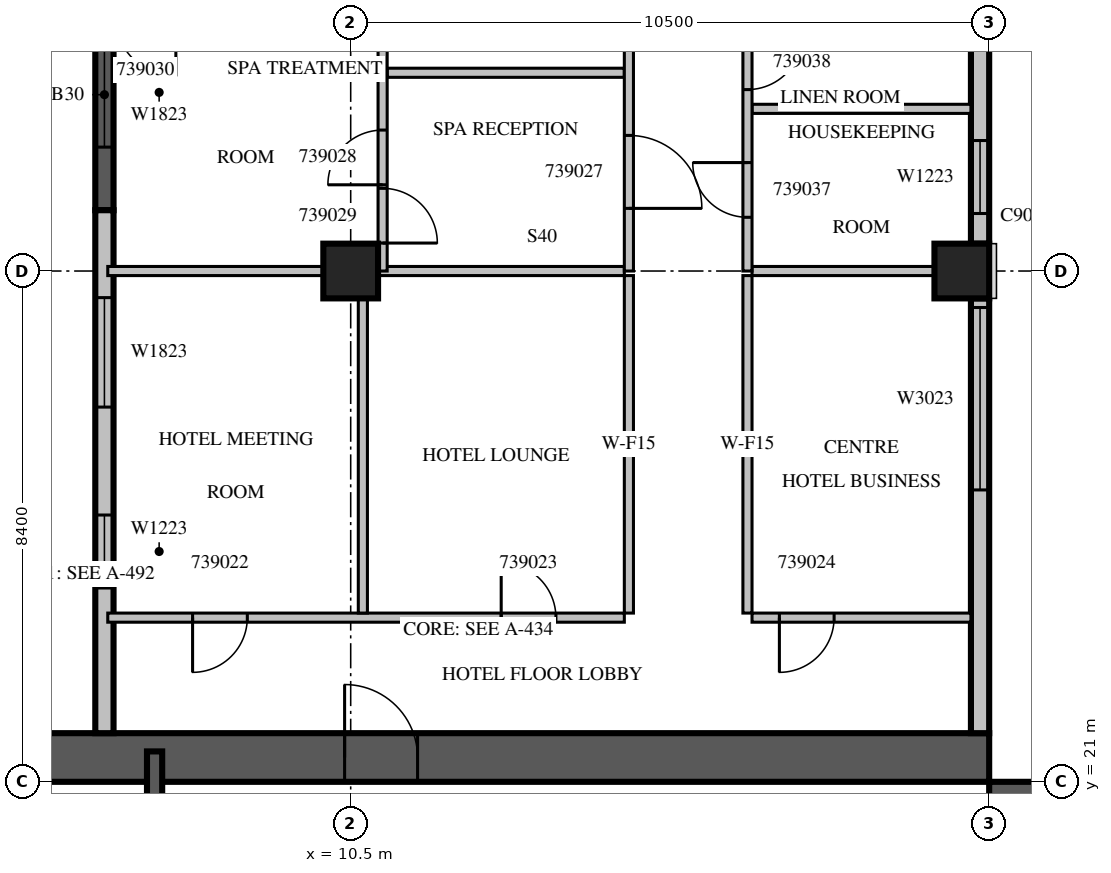
"""IFC4 building model, lengths in metres.
Left out: names, types, materials, properties, quantities, classifications, styles, units other than length and angle.
Written with IfcOpenShell. Run it as: python <this file> out.ifc"""

import sys

from ifc_helpers import new_model, si_unit, direction, frame, frame_2d, origin, origin_2d, place, context, subcontext, project, spatial, rectangle, extrude, source, transform, mapped, element, fill, save


model = new_model("IFC4")
c1 = context("Model", 3, precision=1e-05, world=origin(), true_north=direction((0.0, 1.0)))
c2 = subcontext(c1, "Body", "Model", "MODEL_VIEW")
j1 = project(units=[si_unit("LENGTHUNIT", "METRE"), si_unit("PLANEANGLEUNIT", "RADIAN")], contexts=[c1])
p1 = place(None, origin())
s1 = spatial("IfcSite", under=j1, at=p1, CompositionType="ELEMENT")
p2 = place(p1, origin())
s2 = spatial("IfcBuilding", under=s1, at=p2, CompositionType="ELEMENT")
p3 = place(p2, frame((0.0, 0.0, 181.6)))
s3 = spatial("IfcBuildingStorey", under=s2, at=p3, CompositionType="ELEMENT", Elevation=181.6)
m1 = source(origin(), c2, "Body", "SweptSolid", [
    extrude(rectangle(XDim=0.9, YDim=0.9, at=origin_2d()), origin(), (0.0, 0.0, 1.0), 3.8),
])
for number, where, z_axis, x_axis in (
    (1, (10.5, 29.4, 0.0), (0.0, 0.0, 1.0), (1.0, 0.0, 0.0)),
    (2, (20.55, 29.4, 0.0), (0.0, 0.0, 1.0), (1.0, 0.0, 0.0)),
):
    element("IfcColumn", number, at=place(p3, frame(where, z_axis=z_axis, x_axis=x_axis)), inside=s3, PredefinedType="COLUMN", context=c2, shape_type="MappedRepresentation", body=[
        mapped(m1, transform((0.0, 0.0, 0.0), scale=1.0)),
    ])
m2 = source(origin(), c2, "Body", "SweptSolid", [
    extrude(rectangle(XDim=16.8, YDim=0.8, at=frame_2d((8.4, 0.0))), origin(), (0.0, 0.0, 1.0), 3.8),
])
p4 = place(p3, frame((21.4, 4.2, 0.0), z_axis=(0.0, 0.0, 1.0), x_axis=(0.0, 1.0, 0.0)))
e3 = element("IfcWall", 3, at=p4, inside=s3, PredefinedType="SHEAR", context=c2, shape_type="MappedRepresentation", body=[
    mapped(m2, transform((0.0, 0.0, 0.0), scale=1.0)),
])
m3 = source(origin(), c2, "Body", "SweptSolid", [
    extrude(rectangle(XDim=2.2, YDim=2.1, at=frame_2d((1.1, 1.05))), frame((0.0, 0.41, 0.0), z_axis=(0.0, -1.0, 0.0), x_axis=(1.0, 0.0, 0.0)), (0.0, 0.0, 1.0), 0.82),
])
p5 = place(p4, frame((4.2, 0.0, 0.0)))
e4 = element("IfcOpeningElement", 4, at=p5, cuts=e3, PredefinedType="OPENING", context=c2, shape_type="MappedRepresentation", body=[
    mapped(m3, transform((0.0, 0.0, 0.0), scale=1.0)),
])
m4 = source(origin(), c2, "Body", "SweptSolid", [
    extrude(rectangle(XDim=1.2, YDim=2.1, at=frame_2d((0.6, 1.05))), frame((0.0, 0.41, 0.0), z_axis=(0.0, -1.0, 0.0), x_axis=(1.0, 0.0, 0.0)), (0.0, 0.0, 1.0), 0.82),
])
p6 = place(p4, frame((14.7, 0.0, 0.0)))
e5 = element("IfcOpeningElement", 5, at=p6, cuts=e3, PredefinedType="OPENING", context=c2, shape_type="MappedRepresentation", body=[
    mapped(m4, transform((0.0, 0.0, 0.0), scale=1.0)),
])
p7 = place(p3, frame((4.2, 21.4, 0.0), z_axis=(0.0, 0.0, 1.0), x_axis=(1.0, 0.0, 0.0)))
e6 = element("IfcWall", 6, at=p7, inside=s3, PredefinedType="SHEAR", context=c2, shape_type="MappedRepresentation", body=[
    mapped(m2, transform((0.0, 0.0, 0.0), scale=1.0)),
])
p8 = place(p7, frame((6.2, 0.0, 0.0)))
e7 = element("IfcOpeningElement", 7, at=p8, cuts=e6, PredefinedType="OPENING", context=c2, shape_type="MappedRepresentation", body=[
    mapped(m4, transform((0.0, 0.0, 0.0), scale=1.0)),
])
m5 = source(origin(), c2, "Body", "SweptSolid", [
    extrude(rectangle(XDim=7.15, YDim=0.3, at=frame_2d((3.575, 0.0))), origin(), (0.0, 0.0, 1.0), 3.4),
])
p9 = place(p3, frame((20.85, 21.8, 0.0), z_axis=(0.0, 0.0, 1.0), x_axis=(0.0, 1.0, 0.0)))
e8 = element("IfcWall", 8, at=p9, inside=s3, PredefinedType="STANDARD", context=c2, shape_type="MappedRepresentation", body=[
    mapped(m5, transform((0.0, 0.0, 0.0), scale=1.0)),
])
m6 = source(origin(), c2, "Body", "SweptSolid", [
    extrude(rectangle(XDim=3.0, YDim=2.3, at=frame_2d((1.5, 1.15))), frame((0.0, 0.16, 0.0), z_axis=(0.0, -1.0, 0.0), x_axis=(1.0, 0.0, 0.0)), (0.0, 0.0, 1.0), 0.32),
])
p10 = place(p9, frame((4.0, 0.0, 0.6)))
e9 = element("IfcOpeningElement", 9, at=p10, cuts=e8, PredefinedType="OPENING", context=c2, shape_type="MappedRepresentation", body=[
    mapped(m6, transform((0.0, 0.0, 0.0), scale=1.0)),
])
m7 = source(origin(), c2, "Body", "SweptSolid", [
    extrude(rectangle(XDim=7.5, YDim=0.3, at=frame_2d((3.75, 0.0))), origin(), (0.0, 0.0, 1.0), 3.4),
])
p11 = place(p3, frame((20.85, 29.85, 0.0), z_axis=(0.0, 0.0, 1.0), x_axis=(0.0, 1.0, 0.0)))
e10 = element("IfcWall", 10, at=p11, inside=s3, PredefinedType="STANDARD", context=c2, shape_type="MappedRepresentation", body=[
    mapped(m7, transform((0.0, 0.0, 0.0), scale=1.0)),
])
m8 = source(origin(), c2, "Body", "SweptSolid", [
    extrude(rectangle(XDim=1.2, YDim=2.3, at=frame_2d((0.6, 1.15))), frame((0.0, 0.16, 0.0), z_axis=(0.0, -1.0, 0.0), x_axis=(1.0, 0.0, 0.0)), (0.0, 0.0, 1.0), 0.32),
])
p12 = place(p11, frame((0.496, 0.0, 0.6)))
e11 = element("IfcOpeningElement", 11, at=p12, cuts=e10, PredefinedType="OPENING", context=c2, shape_type="MappedRepresentation", body=[
    mapped(m8, transform((0.0, 0.0, 0.0), scale=1.0)),
])
m9 = source(origin(), c2, "Body", "SweptSolid", [
    extrude(rectangle(XDim=1.0, YDim=2.1, at=frame_2d((0.5, 1.05))), frame((0.0, 0.16, 0.0), z_axis=(0.0, -1.0, 0.0), x_axis=(1.0, 0.0, 0.0)), (0.0, 0.0, 1.0), 0.32),
])
p13 = place(p11, frame((5.35, 0.0, 0.0)))
e12 = element("IfcOpeningElement", 12, at=p13, cuts=e10, PredefinedType="OPENING", context=c2, shape_type="MappedRepresentation", body=[
    mapped(m9, transform((0.0, 0.0, 0.0), scale=1.0)),
])
m10 = source(origin(), c2, "Body", "SweptSolid", [
    extrude(rectangle(XDim=3.8, YDim=0.3, at=frame_2d((1.9, 0.0))), origin(), (0.0, 0.0, 1.0), 3.4),
])
p14 = place(p3, frame((6.45, 34.2, 0.0), z_axis=(0.0, 0.0, 1.0), x_axis=(0.0, -1.0, 0.0)))
e13 = element("IfcWall", 13, at=p14, inside=s3, PredefinedType="SOLIDWALL", context=c2, shape_type="MappedRepresentation", body=[
    mapped(m10, transform((0.0, 0.0, 0.0), scale=1.0)),
])
m11 = source(origin(), c2, "Body", "SweptSolid", [
    extrude(rectangle(XDim=1.8, YDim=2.3, at=frame_2d((0.9, 1.15))), frame((0.0, 0.16, 0.0), z_axis=(0.0, -1.0, 0.0), x_axis=(1.0, 0.0, 0.0)), (0.0, 0.0, 1.0), 0.32),
])
p15 = place(p14, frame((0.963, 0.0, 0.6)))
e14 = element("IfcOpeningElement", 14, at=p15, cuts=e13, PredefinedType="OPENING", context=c2, shape_type="MappedRepresentation", body=[
    mapped(m11, transform((0.0, 0.0, 0.0), scale=1.0)),
])
p16 = place(p3, frame((6.45, 30.4, 0.0), z_axis=(0.0, 0.0, 1.0), x_axis=(0.0, -1.0, 0.0)))
e15 = element("IfcWall", 15, at=p16, inside=s3, PredefinedType="STANDARD", context=c2, shape_type="SweptSolid", body=[
    extrude(rectangle(XDim=8.6, YDim=0.3, at=frame_2d((4.3, 0.0))), origin(), (0.0, 0.0, 1.0), 3.4),
])
p17 = place(p16, frame((1.438, 0.0, 0.6)))
e16 = element("IfcOpeningElement", 16, at=p17, cuts=e15, PredefinedType="OPENING", context=c2, shape_type="MappedRepresentation", body=[
    mapped(m11, transform((0.0, 0.0, 0.0), scale=1.0)),
])
p18 = place(p16, frame((5.013, 0.0, 0.6)))
e17 = element("IfcOpeningElement", 17, at=p18, cuts=e15, PredefinedType="OPENING", context=c2, shape_type="MappedRepresentation", body=[
    mapped(m8, transform((0.0, 0.0, 0.0), scale=1.0)),
])
m12 = source(origin(), c2, "Body", "SweptSolid", [
    extrude(rectangle(XDim=6.6, YDim=0.25, at=frame_2d((3.3, 0.0))), origin(), (0.0, 0.0, 1.0), 3.4),
])
p19 = place(p3, frame((7.275, 14.9, 0.0), z_axis=(0.0, 0.0, 1.0), x_axis=(0.0, 1.0, 0.0)))
e18 = element("IfcWall", 18, at=p19, inside=s3, PredefinedType="SOLIDWALL", context=c2, shape_type="MappedRepresentation", body=[
    mapped(m12, transform((0.0, 0.0, 0.0), scale=1.0)),
])
m13 = source(origin(), c2, "Body", "SweptSolid", [
    extrude(rectangle(XDim=1.1, YDim=2.1, at=frame_2d((0.55, 1.05))), frame((0.0, 0.135, 0.0), z_axis=(0.0, -1.0, 0.0), x_axis=(1.0, 0.0, 0.0)), (0.0, 0.0, 1.0), 0.27),
])
p20 = place(p19, frame((0.15, 0.0, 0.0)))
e19 = element("IfcOpeningElement", 19, at=p20, cuts=e18, PredefinedType="OPENING", context=c2, shape_type="MappedRepresentation", body=[
    mapped(m13, transform((0.0, 0.0, 0.0), scale=1.0)),
])
m14 = source(origin(), c2, "Body", "SweptSolid", [
    extrude(rectangle(XDim=8.495, YDim=0.15, at=frame_2d((4.247, 0.0))), origin(), (0.0, 0.0, 1.0), 3.4),
])
p21 = place(p3, frame((6.505, 23.7, 0.0), z_axis=(0.0, 0.0, 1.0), x_axis=(1.0, 0.0, 0.0)))
e20 = element("IfcWall", 20, at=p21, inside=s3, PredefinedType="PARTITIONING", context=c2, shape_type="MappedRepresentation", body=[
    mapped(m14, transform((0.0, 0.0, 0.0), scale=1.0)),
])
m15 = source(origin(), c2, "Body", "SweptSolid", [
    extrude(rectangle(XDim=0.9, YDim=2.1, at=frame_2d((0.45, 1.05))), frame((0.0, 0.085, 0.0), z_axis=(0.0, -1.0, 0.0), x_axis=(1.0, 0.0, 0.0)), (0.0, 0.0, 1.0), 0.17),
])
p22 = place(p21, frame((1.395, 0.0, 0.0)))
e21 = element("IfcOpeningElement", 21, at=p22, cuts=e20, PredefinedType="OPENING", context=c2, shape_type="MappedRepresentation", body=[
    mapped(m15, transform((0.0, 0.0, 0.0), scale=1.0)),
])
p23 = place(p21, frame((6.47, 0.0, 0.0)))
e22 = element("IfcOpeningElement", 22, at=p23, cuts=e20, PredefinedType="OPENING", context=c2, shape_type="MappedRepresentation", body=[
    mapped(m15, transform((0.0, 0.0, 0.0), scale=1.0)),
])
m16 = source(origin(), c2, "Body", "SweptSolid", [
    extrude(rectangle(XDim=3.6, YDim=0.15, at=frame_2d((1.8, 0.0))), origin(), (0.0, 0.0, 1.0), 3.4),
])
p24 = place(p3, frame((17.1, 23.7, 0.0), z_axis=(0.0, 0.0, 1.0), x_axis=(1.0, 0.0, 0.0)))
e23 = element("IfcWall", 23, at=p24, inside=s3, PredefinedType="PARTITIONING", context=c2, shape_type="MappedRepresentation", body=[
    mapped(m16, transform((0.0, 0.0, 0.0), scale=1.0)),
])
p25 = place(p24, frame((0.45, 0.0, 0.0)))
e24 = element("IfcOpeningElement", 24, at=p25, cuts=e23, PredefinedType="OPENING", context=c2, shape_type="MappedRepresentation", body=[
    mapped(m15, transform((0.0, 0.0, 0.0), scale=1.0)),
])
m17 = source(origin(), c2, "Body", "SweptSolid", [
    extrude(rectangle(XDim=5.176, YDim=0.15, at=frame_2d((2.588, 0.0))), origin(), (0.0, 0.0, 1.0), 3.4),
])
p26 = place(p3, frame((10.7, 23.775, 0.0), z_axis=(0.0, 0.0, 1.0), x_axis=(0.0, 1.0, 0.0)))
e25 = element("IfcWall", 25, at=p26, inside=s3, PredefinedType="PARTITIONING", context=c2, shape_type="MappedRepresentation", body=[
    mapped(m17, transform((0.0, 0.0, 0.0), scale=1.0)),
])
m18 = source(origin(), c2, "Body", "SweptSolid", [
    extrude(rectangle(XDim=5.55, YDim=0.15, at=frame_2d((2.775, 0.0))), origin(), (0.0, 0.0, 1.0), 3.4),
])
for number, where, z_axis, x_axis in (
    (26, (15.075, 23.775, 0.0), (0.0, 0.0, 1.0), (0.0, 1.0, 0.0)),
    (27, (17.025, 29.325, 0.0), (0.0, 0.0, 1.0), (0.0, -1.0, 0.0)),
):
    element("IfcWall", number, at=place(p3, frame(where, z_axis=z_axis, x_axis=x_axis)), inside=s3, PredefinedType="PARTITIONING", context=c2, shape_type="MappedRepresentation", body=[
        mapped(m18, transform((0.0, 0.0, 0.0), scale=1.0)),
    ])
m19 = source(origin(), c2, "Body", "SweptSolid", [
    extrude(rectangle(XDim=3.546, YDim=0.15, at=frame_2d((1.773, 0.0))), origin(), (0.0, 0.0, 1.0), 3.4),
])
p27 = place(p3, frame((10.051, 29.4, 0.0), z_axis=(0.0, 0.0, 1.0), x_axis=(-1.0, 0.0, 0.0)))
e28 = element("IfcWall", 28, at=p27, inside=s3, PredefinedType="PARTITIONING", context=c2, shape_type="MappedRepresentation", body=[
    mapped(m19, transform((0.0, 0.0, 0.0), scale=1.0)),
])
m20 = source(origin(), c2, "Body", "SweptSolid", [
    extrude(rectangle(XDim=4.051, YDim=0.15, at=frame_2d((2.026, 0.0))), origin(), (0.0, 0.0, 1.0), 3.4),
])
p28 = place(p3, frame((15.0, 29.4, 0.0), z_axis=(0.0, 0.0, 1.0), x_axis=(-1.0, 0.0, 0.0)))
e29 = element("IfcWall", 29, at=p28, inside=s3, PredefinedType="PARTITIONING", context=c2, shape_type="MappedRepresentation", body=[
    mapped(m20, transform((0.0, 0.0, 0.0), scale=1.0)),
])
m21 = source(origin(), c2, "Body", "SweptSolid", [
    extrude(rectangle(XDim=3.001, YDim=0.15, at=frame_2d((1.5, 0.0))), origin(), (0.0, 0.0, 1.0), 3.4),
])
p29 = place(p3, frame((20.101, 29.4, 0.0), z_axis=(0.0, 0.0, 1.0), x_axis=(-1.0, 0.0, 0.0)))
e30 = element("IfcWall", 30, at=p29, inside=s3, PredefinedType="PARTITIONING", context=c2, shape_type="MappedRepresentation", body=[
    mapped(m21, transform((0.0, 0.0, 0.0), scale=1.0)),
])
m22 = source(origin(), c2, "Body", "SweptSolid", [
    extrude(rectangle(XDim=3.9, YDim=0.15, at=frame_2d((1.95, 0.0))), origin(), (0.0, 0.0, 1.0), 3.4),
])
p30 = place(p3, frame((15.0, 32.66, 0.0), z_axis=(0.0, 0.0, 1.0), x_axis=(-1.0, 0.0, 0.0)))
e31 = element("IfcWall", 31, at=p30, inside=s3, PredefinedType="PARTITIONING", context=c2, shape_type="MappedRepresentation", body=[
    mapped(m22, transform((0.0, 0.0, 0.0), scale=1.0)),
])
m23 = source(origin(), c2, "Body", "SweptSolid", [
    extrude(rectangle(XDim=8.4, YDim=0.15, at=frame_2d((4.2, 0.0))), origin(), (0.0, 0.0, 1.0), 3.4),
])
p31 = place(p3, frame((11.025, 29.4, 0.0), z_axis=(0.0, 0.0, 1.0), x_axis=(0.0, 1.0, 0.0)))
e32 = element("IfcWall", 32, at=p31, inside=s3, PredefinedType="PARTITIONING", context=c2, shape_type="MappedRepresentation", body=[
    mapped(m23, transform((0.0, 0.0, 0.0), scale=1.0)),
])
p32 = place(p31, frame((1.418, 0.0, 0.0)))
e33 = element("IfcOpeningElement", 33, at=p32, cuts=e32, PredefinedType="OPENING", context=c2, shape_type="MappedRepresentation", body=[
    mapped(m15, transform((0.0, 0.0, 0.0), scale=1.0)),
])
p33 = place(p31, frame((0.46, 0.0, 0.0)))
e34 = element("IfcOpeningElement", 34, at=p33, cuts=e32, PredefinedType="OPENING", context=c2, shape_type="MappedRepresentation", body=[
    mapped(m15, transform((0.0, 0.0, 0.0), scale=1.0)),
])
p34 = place(p31, frame((4.525, 0.0, 0.0)))
e35 = element("IfcOpeningElement", 35, at=p34, cuts=e32, PredefinedType="OPENING", context=c2, shape_type="MappedRepresentation", body=[
    mapped(m15, transform((0.0, 0.0, 0.0), scale=1.0)),
])
p35 = place(p31, frame((6.387, 0.0, 0.0)))
e36 = element("IfcOpeningElement", 36, at=p35, cuts=e32, PredefinedType="OPENING", context=c2, shape_type="MappedRepresentation", body=[
    mapped(m15, transform((0.0, 0.0, 0.0), scale=1.0)),
])
p36 = place(p3, frame((17.1, 32.067, 0.0), z_axis=(0.0, 0.0, 1.0), x_axis=(1.0, 0.0, 0.0)))
e37 = element("IfcWall", 37, at=p36, inside=s3, PredefinedType="PARTITIONING", context=c2, shape_type="MappedRepresentation", body=[
    mapped(m16, transform((0.0, 0.0, 0.0), scale=1.0)),
])
p37 = place(p3, frame((15.075, 29.4, 0.0), z_axis=(0.0, 0.0, 1.0), x_axis=(0.0, 1.0, 0.0)))
e38 = element("IfcWall", 38, at=p37, inside=s3, PredefinedType="PARTITIONING", context=c2, shape_type="MappedRepresentation", body=[
    mapped(m23, transform((0.0, 0.0, 0.0), scale=1.0)),
])
m24 = source(origin(), c2, "Body", "SweptSolid", [
    extrude(rectangle(XDim=1.2, YDim=2.1, at=frame_2d((0.6, 1.05))), frame((0.0, 0.085, 0.0), z_axis=(0.0, -1.0, 0.0), x_axis=(1.0, 0.0, 0.0)), (0.0, 0.0, 1.0), 0.17),
])
p38 = place(p37, frame((1.03, 0.0, 0.0)))
e39 = element("IfcOpeningElement", 39, at=p38, cuts=e38, PredefinedType="OPENING", context=c2, shape_type="MappedRepresentation", body=[
    mapped(m24, transform((0.0, 0.0, 0.0), scale=1.0)),
])
m25 = source(origin(), c2, "Body", "SweptSolid", [
    extrude(rectangle(XDim=19.86, YDim=0.15, at=frame_2d((9.93, 0.0))), origin(), (0.0, 0.0, 1.0), 3.4),
])
p39 = place(p3, frame((17.025, 49.26, 0.0), z_axis=(0.0, 0.0, 1.0), x_axis=(0.0, -1.0, 0.0)))
e40 = element("IfcWall", 40, at=p39, inside=s3, PredefinedType="PARTITIONING", context=c2, shape_type="MappedRepresentation", body=[
    mapped(m25, transform((0.0, 0.0, 0.0), scale=1.0)),
])
p40 = place(p39, frame((18.076, 0.0, 0.0)))
e41 = element("IfcOpeningElement", 41, at=p40, cuts=e40, PredefinedType="OPENING", context=c2, shape_type="MappedRepresentation", body=[
    mapped(m15, transform((0.0, 0.0, 0.0), scale=1.0)),
])
p41 = place(p39, frame((15.976, 0.0, 0.0)))
e42 = element("IfcOpeningElement", 42, at=p41, cuts=e40, PredefinedType="OPENING", context=c2, shape_type="MappedRepresentation", body=[
    mapped(m15, transform((0.0, 0.0, 0.0), scale=1.0)),
])
m26 = source(origin(), c2, "Body", "SweptSolid", [
    extrude(rectangle(XDim=1.0, YDim=2.1, at=frame_2d((0.5, 1.05))), frame((0.0, 0.085, 0.0), z_axis=(0.0, -1.0, 0.0), x_axis=(1.0, 0.0, 0.0)), (0.0, 0.0, 1.0), 0.17),
])
p42 = place(p39, frame((12.398, 0.0, 0.0)))
e43 = element("IfcOpeningElement", 43, at=p42, cuts=e40, PredefinedType="OPENING", context=c2, shape_type="MappedRepresentation", body=[
    mapped(m26, transform((0.0, 0.0, 0.0), scale=1.0)),
])
p43 = place(p39, frame((3.143, 0.0, 0.0)))
e44 = element("IfcOpeningElement", 44, at=p43, cuts=e40, PredefinedType="OPENING", context=c2, shape_type="MappedRepresentation", body=[
    mapped(m15, transform((0.0, 0.0, 0.0), scale=1.0)),
])
m27 = source(origin(), c2, "Body", "SweptSolid", [
    extrude(rectangle(XDim=3.0, YDim=2.3, at=frame_2d((1.5, 1.15))), frame((0.0, 0.03, 0.0), z_axis=(0.0, -1.0, 0.0), x_axis=(1.0, 0.0, 0.0)), (0.0, 0.0, 1.0), 0.06),
])
p44 = place(p10, origin())
e45 = element("IfcWindow", 45, at=p44, inside=s3, PartitioningType="SINGLE_PANEL", PredefinedType="WINDOW", context=c2, shape_type="MappedRepresentation", body=[
    mapped(m27, transform((0.0, 0.0, 0.0), scale=1.0)),
])
fill(e9, e45)
m28 = source(origin(), c2, "Body", "SweptSolid", [
    extrude(rectangle(XDim=1.2, YDim=2.3, at=frame_2d((0.6, 1.15))), frame((0.0, 0.03, 0.0), z_axis=(0.0, -1.0, 0.0), x_axis=(1.0, 0.0, 0.0)), (0.0, 0.0, 1.0), 0.06),
])
p45 = place(p12, origin())
e46 = element("IfcWindow", 46, at=p45, inside=s3, PartitioningType="SINGLE_PANEL", PredefinedType="WINDOW", context=c2, shape_type="MappedRepresentation", body=[
    mapped(m28, transform((0.0, 0.0, 0.0), scale=1.0)),
])
fill(e11, e46)
m29 = source(origin(), c2, "Body", "SweptSolid", [
    extrude(rectangle(XDim=1.8, YDim=2.3, at=frame_2d((0.9, 1.15))), frame((0.0, 0.03, 0.0), z_axis=(0.0, -1.0, 0.0), x_axis=(1.0, 0.0, 0.0)), (0.0, 0.0, 1.0), 0.06),
])
p46 = place(p15, origin())
e47 = element("IfcWindow", 47, at=p46, inside=s3, PartitioningType="SINGLE_PANEL", PredefinedType="WINDOW", context=c2, shape_type="MappedRepresentation", body=[
    mapped(m29, transform((0.0, 0.0, 0.0), scale=1.0)),
])
fill(e14, e47)
p47 = place(p17, origin())
e48 = element("IfcWindow", 48, at=p47, inside=s3, PartitioningType="SINGLE_PANEL", PredefinedType="WINDOW", context=c2, shape_type="MappedRepresentation", body=[
    mapped(m29, transform((0.0, 0.0, 0.0), scale=1.0)),
])
fill(e16, e48)
p48 = place(p18, origin())
e49 = element("IfcWindow", 49, at=p48, inside=s3, PartitioningType="SINGLE_PANEL", PredefinedType="WINDOW", context=c2, shape_type="MappedRepresentation", body=[
    mapped(m28, transform((0.0, 0.0, 0.0), scale=1.0)),
])
fill(e17, e49)
m30 = source(origin(), c2, "Body", "SweptSolid", [
    extrude(rectangle(XDim=1.2, YDim=2.1, at=frame_2d((0.6, 1.05))), frame((0.0, 0.025, 0.0), z_axis=(0.0, -1.0, 0.0), x_axis=(1.0, 0.0, 0.0)), (0.0, 0.0, 1.0), 0.05),
])
p49 = place(p8, origin())
e50 = element("IfcDoor", 50, at=p49, inside=s3, OperationType="SINGLE_SWING_LEFT", PredefinedType="DOOR", context=c2, shape_type="MappedRepresentation", body=[
    mapped(m30, transform((0.0, 0.0, 0.0), scale=1.0)),
])
fill(e7, e50)
m31 = source(origin(), c2, "Body", "SweptSolid", [
    extrude(rectangle(XDim=0.9, YDim=2.1, at=frame_2d((0.45, 1.05))), frame((0.0, 0.025, 0.0), z_axis=(0.0, -1.0, 0.0), x_axis=(1.0, 0.0, 0.0)), (0.0, 0.0, 1.0), 0.05),
])
p50 = place(p22, origin())
e51 = element("IfcDoor", 51, at=p50, inside=s3, OperationType="SINGLE_SWING_RIGHT", PredefinedType="DOOR", context=c2, shape_type="MappedRepresentation", body=[
    mapped(m31, transform((0.0, 0.0, 0.0), scale=1.0)),
])
fill(e21, e51)
p51 = place(p23, origin())
e52 = element("IfcDoor", 52, at=p51, inside=s3, OperationType="SINGLE_SWING_LEFT", PredefinedType="DOOR", context=c2, shape_type="MappedRepresentation", body=[
    mapped(m31, transform((0.0, 0.0, 0.0), scale=1.0)),
])
fill(e22, e52)
p52 = place(p25, origin())
e53 = element("IfcDoor", 53, at=p52, inside=s3, OperationType="SINGLE_SWING_RIGHT", PredefinedType="DOOR", context=c2, shape_type="MappedRepresentation", body=[
    mapped(m31, transform((0.0, 0.0, 0.0), scale=1.0)),
])
fill(e24, e53)
p53 = place(p38, origin())
e54 = element("IfcDoor", 54, at=p53, inside=s3, OperationType="SINGLE_SWING_RIGHT", PredefinedType="DOOR", context=c2, shape_type="MappedRepresentation", body=[
    mapped(m30, transform((0.0, 0.0, 0.0), scale=1.0)),
])
fill(e39, e54)
p54 = place(p32, origin())
e55 = element("IfcDoor", 55, at=p54, inside=s3, OperationType="SINGLE_SWING_LEFT", PredefinedType="DOOR", context=c2, shape_type="MappedRepresentation", body=[
    mapped(m31, transform((0.0, 0.0, 0.0), scale=1.0)),
])
fill(e33, e55)
p55 = place(p33, origin())
e56 = element("IfcDoor", 56, at=p55, inside=s3, OperationType="SINGLE_SWING_RIGHT", PredefinedType="DOOR", context=c2, shape_type="MappedRepresentation", body=[
    mapped(m31, transform((0.0, 0.0, 0.0), scale=1.0)),
])
fill(e34, e56)
p56 = place(p40, origin())
e57 = element("IfcDoor", 57, at=p56, inside=s3, OperationType="SINGLE_SWING_RIGHT", PredefinedType="DOOR", context=c2, shape_type="MappedRepresentation", body=[
    mapped(m31, transform((0.0, 0.0, 0.0), scale=1.0)),
])
fill(e41, e57)
p57 = place(p41, origin())
e58 = element("IfcDoor", 58, at=p57, inside=s3, OperationType="SINGLE_SWING_LEFT", PredefinedType="DOOR", context=c2, shape_type="MappedRepresentation", body=[
    mapped(m31, transform((0.0, 0.0, 0.0), scale=1.0)),
])
fill(e42, e58)
save(model, sys.argv[1])
